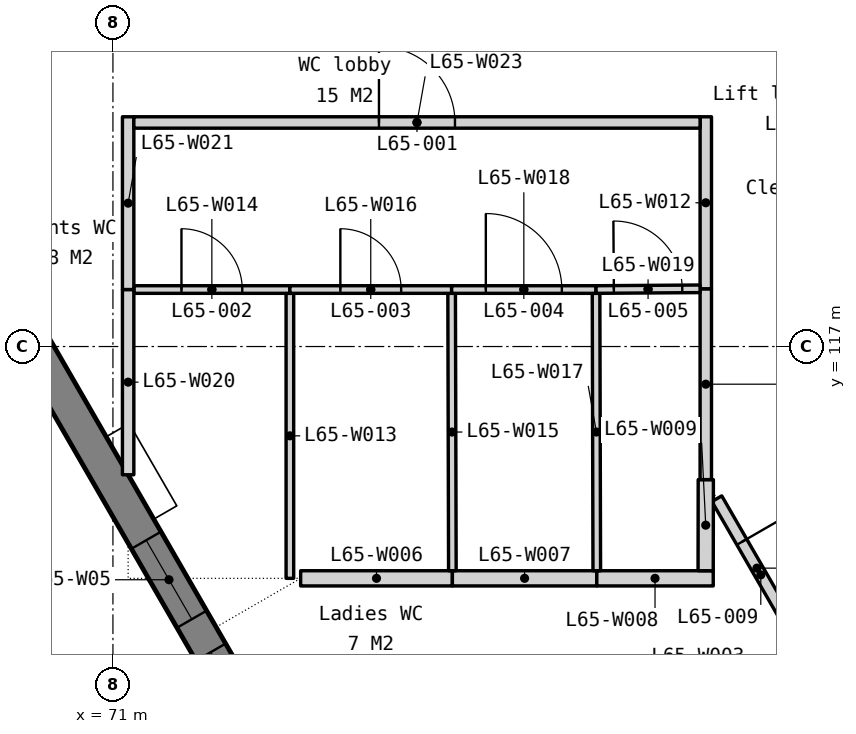
"""IFC4 building model, lengths in metres.
Left out: names, types, materials, properties, quantities, classifications, styles, units other than length and angle.
Written with IfcOpenShell. Run it as: python <this file> out.ifc"""

import sys

from ifc_helpers import new_model, si_unit, direction, frame, frame_2d, origin, place, context, subcontext, project, spatial, polyline, rectangle, outline, extrude, element, fill, save


model = new_model("IFC4")
c1 = context("Model", 3, precision=1e-05, world=origin(), true_north=direction((0.0, 1.0)))
c2 = subcontext(c1, "Body", "Model", "MODEL_VIEW")
j1 = project(units=[si_unit("LENGTHUNIT", "METRE"), si_unit("PLANEANGLEUNIT", "RADIAN")], contexts=[c1])
p1 = place(None, origin())
s1 = spatial("IfcSite", under=j1, at=p1, CompositionType="ELEMENT")
p2 = place(p1, origin())
s2 = spatial("IfcBuilding", under=s1, at=p2, CompositionType="ELEMENT")
p3 = place(p2, frame((0.0, 0.0, 266.0)))
s3 = spatial("IfcBuildingStorey", under=s2, at=p3, CompositionType="ELEMENT", Elevation=266.0)
p4 = place(p3, frame((60.609, 133.207, -0.15), z_axis=(0.0, 0.0, 1.0), x_axis=(0.500002536638, -0.866023939251, 0.0)))
e1 = element("IfcWall", 1, at=p4, inside=s3, PredefinedType="SOLIDWALL", context=c2, shape_type="SweptSolid", body=[
    extrude(outline(polyline([(36.972, 0.0), (36.972, 3.9), (0.0, 3.9), (0.0, 0.0), (36.972, 0.0)])), frame((0.0, 0.225, 0.0), z_axis=(0.0, -1.0, 0.0), x_axis=(1.0, 0.0, 0.0)), (0.0, 0.0, 1.0), 0.45),
])
p5 = place(p4, frame((3.172, 0.0, 0.95)))
e2 = element("IfcOpeningElement", 2, at=p5, cuts=e1, PredefinedType="OPENING", context=c2, shape_type="SweptSolid", body=[
    extrude(rectangle(XDim=1.2, YDim=2.2, at=frame_2d((0.6, 1.1))), frame((0.0, 0.235, 0.0), z_axis=(0.0, -1.0, 0.0), x_axis=(1.0, 0.0, 0.0)), (0.0, 0.0, 1.0), 0.47),
])
p6 = place(p4, frame((4.872, 0.0, 0.95)))
e3 = element("IfcOpeningElement", 3, at=p6, cuts=e1, PredefinedType="OPENING", context=c2, shape_type="SweptSolid", body=[
    extrude(rectangle(XDim=1.2, YDim=2.2, at=frame_2d((0.6, 1.1))), frame((0.0, 0.235, 0.0), z_axis=(0.0, -1.0, 0.0), x_axis=(1.0, 0.0, 0.0)), (0.0, 0.0, 1.0), 0.47),
])
p7 = place(p4, frame((12.415, 0.0, 0.95)))
e4 = element("IfcOpeningElement", 4, at=p7, cuts=e1, PredefinedType="OPENING", context=c2, shape_type="SweptSolid", body=[
    extrude(rectangle(XDim=1.2, YDim=2.2, at=frame_2d((0.6, 1.1))), frame((0.0, 0.235, 0.0), z_axis=(0.0, -1.0, 0.0), x_axis=(1.0, 0.0, 0.0)), (0.0, 0.0, 1.0), 0.47),
])
p8 = place(p4, frame((14.115, 0.0, 0.95)))
e5 = element("IfcOpeningElement", 5, at=p8, cuts=e1, PredefinedType="OPENING", context=c2, shape_type="SweptSolid", body=[
    extrude(rectangle(XDim=1.2, YDim=2.2, at=frame_2d((0.6, 1.1))), frame((0.0, 0.235, 0.0), z_axis=(0.0, -1.0, 0.0), x_axis=(1.0, 0.0, 0.0)), (0.0, 0.0, 1.0), 0.47),
])
p9 = place(p4, frame((21.658, 0.0, 0.95)))
e6 = element("IfcOpeningElement", 6, at=p9, cuts=e1, PredefinedType="OPENING", context=c2, shape_type="SweptSolid", body=[
    extrude(rectangle(XDim=1.2, YDim=2.2, at=frame_2d((0.6, 1.1))), frame((0.0, 0.235, 0.0), z_axis=(0.0, -1.0, 0.0), x_axis=(1.0, 0.0, 0.0)), (0.0, 0.0, 1.0), 0.47),
])
p10 = place(p4, frame((23.358, 0.0, 0.95)))
e7 = element("IfcOpeningElement", 7, at=p10, cuts=e1, PredefinedType="OPENING", context=c2, shape_type="SweptSolid", body=[
    extrude(rectangle(XDim=1.2, YDim=2.2, at=frame_2d((0.6, 1.1))), frame((0.0, 0.235, 0.0), z_axis=(0.0, -1.0, 0.0), x_axis=(1.0, 0.0, 0.0)), (0.0, 0.0, 1.0), 0.47),
])
p11 = place(p4, frame((30.901, 0.0, 0.95)))
e8 = element("IfcOpeningElement", 8, at=p11, cuts=e1, PredefinedType="OPENING", context=c2, shape_type="SweptSolid", body=[
    extrude(rectangle(XDim=1.2, YDim=2.2, at=frame_2d((0.6, 1.1))), frame((0.0, 0.235, 0.0), z_axis=(0.0, -1.0, 0.0), x_axis=(1.0, 0.0, 0.0)), (0.0, 0.0, 1.0), 0.47),
])
p12 = place(p4, frame((32.601, 0.0, 0.95)))
e9 = element("IfcOpeningElement", 9, at=p12, cuts=e1, PredefinedType="OPENING", context=c2, shape_type="SweptSolid", body=[
    extrude(rectangle(XDim=1.2, YDim=2.2, at=frame_2d((0.6, 1.1))), frame((0.0, 0.235, 0.0), z_axis=(0.0, -1.0, 0.0), x_axis=(1.0, 0.0, 0.0)), (0.0, 0.0, 1.0), 0.47),
])
p13 = place(p3, frame((78.945, 114.998, 0.0), z_axis=(0.0, 0.0, 1.0), x_axis=(0.499959494327, -0.866048788483, 0.0)))
e10 = element("IfcWall", 10, at=p13, inside=s3, PredefinedType="PARTITIONING", context=c2, shape_type="SweptSolid", body=[
    extrude(rectangle(XDim=2.11, YDim=0.15, at=frame_2d((1.055, 0.0))), origin(), (0.0, 0.0, 1.0), 3.75),
])
p14 = place(p13, frame((0.657, 0.0, 0.0)))
e11 = element("IfcOpeningElement", 11, at=p14, cuts=e10, PredefinedType="OPENING", context=c2, shape_type="SweptSolid", body=[
    extrude(rectangle(XDim=1.0, YDim=2.1, at=frame_2d((0.5, 1.05))), frame((0.0, 0.085, 0.0), z_axis=(0.0, -1.0, 0.0), x_axis=(1.0, 0.0, 0.0)), (0.0, 0.0, 1.0), 0.17),
])
p15 = place(p3, frame((73.47, 113.95, 0.0), z_axis=(0.0, 0.0, 1.0), x_axis=(1.0, 0.0, 0.0)))
e12 = element("IfcWall", 12, at=p15, inside=s3, PredefinedType="PARTITIONING", context=c2, shape_type="SweptSolid", body=[
    extrude(rectangle(XDim=1.996, YDim=0.2, at=frame_2d((0.998, 0.0))), origin(), (0.0, 0.0, 1.0), 3.75),
])
p16 = place(p3, frame((75.466, 113.95, 0.0), z_axis=(0.0, 0.0, 1.0), x_axis=(1.0, 0.0, 0.0)))
e13 = element("IfcWall", 13, at=p16, inside=s3, PredefinedType="PARTITIONING", context=c2, shape_type="SweptSolid", body=[
    extrude(rectangle(XDim=1.9, YDim=0.2, at=frame_2d((0.95, 0.0))), origin(), (0.0, 0.0, 1.0), 3.75),
])
p17 = place(p3, frame((77.366, 113.95, 0.0), z_axis=(0.0, 0.0, 1.0), x_axis=(1.0, 0.0, 0.0)))
e14 = element("IfcWall", 14, at=p17, inside=s3, PredefinedType="PARTITIONING", context=c2, shape_type="SweptSolid", body=[
    extrude(rectangle(XDim=1.532, YDim=0.2, at=frame_2d((0.766, 0.0))), origin(), (0.0, 0.0, 1.0), 3.75),
])
p18 = place(p3, frame((78.798, 114.05, 0.0), z_axis=(0.0, 0.0, 1.0), x_axis=(0.00162899397, 0.999998673188, 0.0)))
e15 = element("IfcWall", 15, at=p18, inside=s3, PredefinedType="PARTITIONING", context=c2, shape_type="SweptSolid", body=[
    extrude(rectangle(XDim=1.199, YDim=0.2, at=frame_2d((0.6, 0.0))), origin(), (0.0, 0.0, 1.0), 3.75),
])
p19 = place(p3, frame((78.8, 115.249, 0.0), z_axis=(0.0, 0.0, 1.0), x_axis=(0.0, 1.0, 0.0)))
e16 = element("IfcWall", 16, at=p19, inside=s3, PredefinedType="PARTITIONING", context=c2, shape_type="SweptSolid", body=[
    extrude(rectangle(XDim=2.511, YDim=0.15, at=frame_2d((1.255, 0.0))), origin(), (0.0, 0.0, 1.0), 3.75),
])
p20 = place(p3, frame((78.8, 117.76, 0.0), z_axis=(0.0, 0.0, 1.0), x_axis=(0.0, 1.0, 0.0)))
e17 = element("IfcWall", 17, at=p20, inside=s3, PredefinedType="PARTITIONING", context=c2, shape_type="SweptSolid", body=[
    extrude(rectangle(XDim=2.263, YDim=0.15, at=frame_2d((1.131, 0.0))), origin(), (0.0, 0.0, 1.0), 3.75),
])
p21 = place(p3, frame((73.328, 113.95, 0.0), z_axis=(0.0, 0.0, 1.0), x_axis=(0.0, 1.0, 0.0)))
e18 = element("IfcWall", 18, at=p21, inside=s3, PredefinedType="PARTITIONING", context=c2, shape_type="SweptSolid", body=[
    extrude(rectangle(XDim=3.75, YDim=0.1, at=frame_2d((1.875, 0.0))), origin(), (0.0, 0.0, 1.0), 3.75),
])
p22 = place(p3, frame((71.275, 117.75, 0.0), z_axis=(0.0, 0.0, 1.0), x_axis=(1.0, 0.0, 0.0)))
e19 = element("IfcWall", 19, at=p22, inside=s3, PredefinedType="PARTITIONING", context=c2, shape_type="SweptSolid", body=[
    extrude(rectangle(XDim=2.053, YDim=0.1, at=frame_2d((1.026, 0.0))), origin(), (0.0, 0.0, 1.0), 3.75),
])
p23 = place(p22, frame((0.626, 0.0, 0.0)))
e20 = element("IfcOpeningElement", 20, at=p23, cuts=e19, PredefinedType="OPENING", context=c2, shape_type="SweptSolid", body=[
    extrude(rectangle(XDim=0.8, YDim=2.1, at=frame_2d((0.4, 1.05))), frame((0.0, 0.06, 0.0), z_axis=(0.0, -1.0, 0.0), x_axis=(1.0, 0.0, 0.0)), (0.0, 0.0, 1.0), 0.12),
])
p24 = place(p3, frame((75.466, 114.05, 0.0), z_axis=(0.0, 0.0, 1.0), x_axis=(-0.002675575707, 0.999996420641, 0.0)))
e21 = element("IfcWall", 21, at=p24, inside=s3, PredefinedType="PARTITIONING", context=c2, shape_type="SweptSolid", body=[
    extrude(rectangle(XDim=3.65, YDim=0.1, at=frame_2d((1.825, 0.0))), origin(), (0.0, 0.0, 1.0), 3.75),
])
p25 = place(p3, frame((73.328, 117.75, 0.0), z_axis=(0.0, 0.0, 1.0), x_axis=(1.0, 0.0, 0.0)))
e22 = element("IfcWall", 22, at=p25, inside=s3, PredefinedType="PARTITIONING", context=c2, shape_type="SweptSolid", body=[
    extrude(rectangle(XDim=2.128, YDim=0.1, at=frame_2d((1.064, 0.0))), origin(), (0.0, 0.0, 1.0), 3.75),
])
p26 = place(p25, frame((0.664, 0.0, 0.0)))
e23 = element("IfcOpeningElement", 23, at=p26, cuts=e22, PredefinedType="OPENING", context=c2, shape_type="SweptSolid", body=[
    extrude(rectangle(XDim=0.8, YDim=2.1, at=frame_2d((0.4, 1.05))), frame((0.0, 0.06, 0.0), z_axis=(0.0, -1.0, 0.0), x_axis=(1.0, 0.0, 0.0)), (0.0, 0.0, 1.0), 0.12),
])
p27 = place(p3, frame((77.366, 114.05, 0.0), z_axis=(0.0, 0.0, 1.0), x_axis=(-0.002608686776, 0.999996597371, 0.0)))
e24 = element("IfcWall", 24, at=p27, inside=s3, PredefinedType="PARTITIONING", context=c2, shape_type="SweptSolid", body=[
    extrude(rectangle(XDim=3.65, YDim=0.1, at=frame_2d((1.825, 0.0))), origin(), (0.0, 0.0, 1.0), 3.75),
])
p28 = place(p3, frame((75.456, 117.75, 0.0), z_axis=(0.0, 0.0, 1.0), x_axis=(1.0, 0.0, 0.0)))
e25 = element("IfcWall", 25, at=p28, inside=s3, PredefinedType="PARTITIONING", context=c2, shape_type="SweptSolid", body=[
    extrude(rectangle(XDim=1.9, YDim=0.1, at=frame_2d((0.95, 0.0))), origin(), (0.0, 0.0, 1.0), 3.75),
])
p29 = place(p28, frame((0.45, 0.0, 0.0)))
e26 = element("IfcOpeningElement", 26, at=p29, cuts=e25, PredefinedType="OPENING", context=c2, shape_type="SweptSolid", body=[
    extrude(rectangle(XDim=1.0, YDim=2.1, at=frame_2d((0.5, 1.05))), frame((0.0, 0.06, 0.0), z_axis=(0.0, -1.0, 0.0), x_axis=(1.0, 0.0, 0.0)), (0.0, 0.0, 1.0), 0.12),
])
p30 = place(p3, frame((77.356, 117.75, 0.0), z_axis=(0.0, 0.0, 1.0), x_axis=(0.999975819379, 0.006954182767, 0.0)))
e27 = element("IfcWall", 27, at=p30, inside=s3, PredefinedType="PARTITIONING", context=c2, shape_type="SweptSolid", body=[
    extrude(rectangle(XDim=1.369, YDim=0.1, at=frame_2d((0.685, 0.0))), origin(), (0.0, 0.0, 1.0), 3.75),
])
p31 = place(p30, frame((0.235, 0.0, 0.0)))
e28 = element("IfcOpeningElement", 28, at=p31, cuts=e27, PredefinedType="OPENING", context=c2, shape_type="SweptSolid", body=[
    extrude(rectangle(XDim=0.9, YDim=2.1, at=frame_2d((0.45, 1.05))), frame((0.0, 0.06, 0.0), z_axis=(0.0, -1.0, 0.0), x_axis=(1.0, 0.0, 0.0)), (0.0, 0.0, 1.0), 0.12),
])
p32 = place(p3, frame((71.2, 115.313, 0.0), z_axis=(0.0, 0.0, 1.0), x_axis=(0.0, 1.0, 0.0)))
e29 = element("IfcWall", 29, at=p32, inside=s3, PredefinedType="PARTITIONING", context=c2, shape_type="SweptSolid", body=[
    extrude(rectangle(XDim=2.437, YDim=0.15, at=frame_2d((1.219, 0.0))), origin(), (0.0, 0.0, 1.0), 3.062),
])
p33 = place(p3, frame((71.2, 117.75, 0.0), z_axis=(0.0, 0.0, 1.0), x_axis=(0.0, 1.0, 0.0)))
e30 = element("IfcWall", 30, at=p33, inside=s3, PredefinedType="PARTITIONING", context=c2, shape_type="SweptSolid", body=[
    extrude(rectangle(XDim=2.273, YDim=0.15, at=frame_2d((1.136, 0.0))), origin(), (0.0, 0.0, 1.0), 3.062),
])
p34 = place(p3, frame((71.275, 119.948, 0.0), z_axis=(0.0, 0.0, 1.0), x_axis=(1.0, 0.0, 0.0)))
e31 = element("IfcWall", 31, at=p34, inside=s3, PredefinedType="PARTITIONING", context=c2, shape_type="SweptSolid", body=[
    extrude(rectangle(XDim=7.45, YDim=0.15, at=frame_2d((3.725, 0.0))), origin(), (0.0, 0.0, 1.0), 3.75),
])
p35 = place(p34, frame((3.225, 0.0, 0.0)))
e32 = element("IfcOpeningElement", 32, at=p35, cuts=e31, PredefinedType="OPENING", context=c2, shape_type="SweptSolid", body=[
    extrude(rectangle(XDim=1.0, YDim=2.1, at=frame_2d((0.5, 1.05))), frame((0.0, 0.085, 0.0), z_axis=(0.0, -1.0, 0.0), x_axis=(1.0, 0.0, 0.0)), (0.0, 0.0, 1.0), 0.17),
])
p36 = place(p9, origin())
e33 = element("IfcWindow", 33, at=p36, inside=s3, PartitioningType="SINGLE_PANEL", PredefinedType="WINDOW", context=c2, shape_type="SweptSolid", body=[
    extrude(rectangle(XDim=1.2, YDim=2.2, at=frame_2d((0.6, 1.1))), frame((0.0, 0.03, 0.0), z_axis=(0.0, -1.0, 0.0), x_axis=(1.0, 0.0, 0.0)), (0.0, 0.0, 1.0), 0.06),
])
fill(e6, e33)
p37 = place(p10, origin())
e34 = element("IfcWindow", 34, at=p37, inside=s3, PartitioningType="SINGLE_PANEL", PredefinedType="WINDOW", context=c2, shape_type="SweptSolid", body=[
    extrude(rectangle(XDim=1.2, YDim=2.2, at=frame_2d((0.6, 1.1))), frame((0.0, 0.03, 0.0), z_axis=(0.0, -1.0, 0.0), x_axis=(1.0, 0.0, 0.0)), (0.0, 0.0, 1.0), 0.06),
])
fill(e7, e34)
p38 = place(p35, origin())
e35 = element("IfcDoor", 35, at=p38, inside=s3, OperationType="SINGLE_SWING_LEFT", PredefinedType="DOOR", context=c2, shape_type="SweptSolid", body=[
    extrude(rectangle(XDim=1.0, YDim=2.1, at=frame_2d((0.5, 1.05))), frame((0.0, 0.025, 0.0), z_axis=(0.0, -1.0, 0.0), x_axis=(1.0, 0.0, 0.0)), (0.0, 0.0, 1.0), 0.05),
])
fill(e32, e35)
p39 = place(p23, origin())
e36 = element("IfcDoor", 36, at=p39, inside=s3, OperationType="SINGLE_SWING_LEFT", PredefinedType="DOOR", context=c2, shape_type="SweptSolid", body=[
    extrude(rectangle(XDim=0.8, YDim=2.1, at=frame_2d((0.4, 1.05))), frame((0.0, 0.025, 0.0), z_axis=(0.0, -1.0, 0.0), x_axis=(1.0, 0.0, 0.0)), (0.0, 0.0, 1.0), 0.05),
])
fill(e20, e36)
p40 = place(p26, origin())
e37 = element("IfcDoor", 37, at=p40, inside=s3, OperationType="SINGLE_SWING_LEFT", PredefinedType="DOOR", context=c2, shape_type="SweptSolid", body=[
    extrude(rectangle(XDim=0.8, YDim=2.1, at=frame_2d((0.4, 1.05))), frame((0.0, 0.025, 0.0), z_axis=(0.0, -1.0, 0.0), x_axis=(1.0, 0.0, 0.0)), (0.0, 0.0, 1.0), 0.05),
])
fill(e23, e37)
p41 = place(p29, origin())
e38 = element("IfcDoor", 38, at=p41, inside=s3, OperationType="SINGLE_SWING_LEFT", PredefinedType="DOOR", context=c2, shape_type="SweptSolid", body=[
    extrude(rectangle(XDim=1.0, YDim=2.1, at=frame_2d((0.5, 1.05))), frame((0.0, 0.025, 0.0), z_axis=(0.0, -1.0, 0.0), x_axis=(1.0, 0.0, 0.0)), (0.0, 0.0, 1.0), 0.05),
])
fill(e26, e38)
p42 = place(p31, origin())
e39 = element("IfcDoor", 39, at=p42, inside=s3, OperationType="SINGLE_SWING_LEFT", PredefinedType="DOOR", context=c2, shape_type="SweptSolid", body=[
    extrude(rectangle(XDim=0.9, YDim=2.1, at=frame_2d((0.45, 1.05))), frame((0.0, 0.025, 0.0), z_axis=(0.0, -1.0, 0.0), x_axis=(1.0, 0.0, 0.0)), (0.0, 0.0, 1.0), 0.05),
])
fill(e28, e39)
p43 = place(p14, origin())
e40 = element("IfcDoor", 40, at=p43, inside=s3, OperationType="SINGLE_SWING_LEFT", PredefinedType="DOOR", context=c2, shape_type="SweptSolid", body=[
    extrude(rectangle(XDim=1.0, YDim=2.1, at=frame_2d((0.5, 1.05))), frame((0.0, 0.025, 0.0), z_axis=(0.0, -1.0, 0.0), x_axis=(1.0, 0.0, 0.0)), (0.0, 0.0, 1.0), 0.05),
])
fill(e11, e40)
save(model, sys.argv[1])
